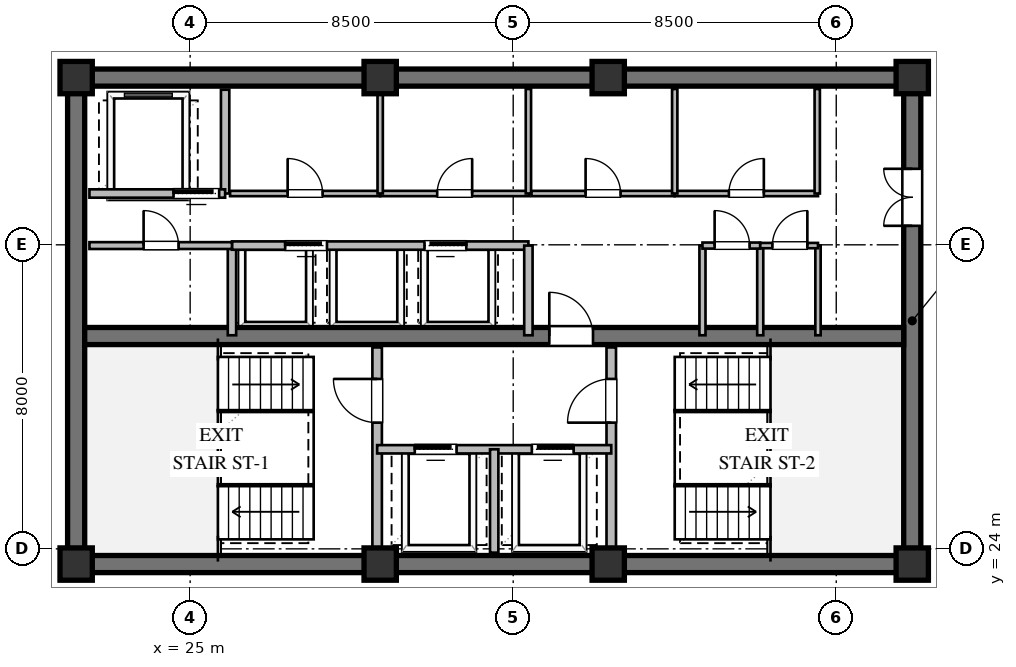
"""IFC4 building model, lengths in metres.
Left out: names, types, materials, properties, quantities, classifications, styles, units other than length and angle.
Written with IfcOpenShell. Run it as: python <this file> out.ifc"""

import sys

from ifc_helpers import new_model, si_unit, direction, frame, frame_2d, origin, origin_2d, place, context, subcontext, project, spatial, rectangle, extrude, element, fill, save


model = new_model("IFC4")
c1 = context("Model", 3, precision=1e-05, world=origin(), true_north=direction((0.0, 1.0)))
c2 = subcontext(c1, "Body", "Model", "MODEL_VIEW")
j1 = project(units=[si_unit("LENGTHUNIT", "METRE"), si_unit("PLANEANGLEUNIT", "RADIAN")], contexts=[c1])
p1 = place(None, origin())
s1 = spatial("IfcSite", under=j1, at=p1, CompositionType="ELEMENT")
p2 = place(p1, origin())
s2 = spatial("IfcBuilding", under=s1, at=p2, CompositionType="ELEMENT")
p3 = place(p2, frame((0.0, 0.0, 231.6)))
s3 = spatial("IfcBuildingStorey", under=s2, at=p3, CompositionType="ELEMENT", Elevation=231.6)
for number, where, z_axis, x_axis in (
    (1, (21.775, 23.6, 0.0), (0.0, 0.0, 1.0), (1.0, 0.0, 0.0)),
    (2, (21.775, 36.4, 0.0), (0.0, 0.0, 1.0), (1.0, 0.0, 0.0)),
):
    element("IfcWall", number, at=place(p3, frame(where, z_axis=z_axis, x_axis=x_axis)), inside=s3, PredefinedType="SHEAR", context=c2, shape_type="SweptSolid", body=[
        extrude(rectangle(XDim=22.45, YDim=0.45, at=frame_2d((11.225, 0.0))), origin(), (0.0, 0.0, 1.0), 3.36),
    ])
p4 = place(p3, frame((22.0, 23.825, 0.0), z_axis=(0.0, 0.0, 1.0), x_axis=(0.0, 1.0, 0.0)))
e3 = element("IfcWall", 3, at=p4, inside=s3, PredefinedType="SHEAR", context=c2, shape_type="SweptSolid", body=[
    extrude(rectangle(XDim=12.35, YDim=0.45, at=frame_2d((6.175, 0.0))), origin(), (0.0, 0.0, 1.0), 3.36),
])
p5 = place(p3, frame((44.0, 23.825, 0.0), z_axis=(0.0, 0.0, 1.0), x_axis=(0.0, 1.0, 0.0)))
e4 = element("IfcWall", 4, at=p5, inside=s3, PredefinedType="SHEAR", context=c2, shape_type="SweptSolid", body=[
    extrude(rectangle(XDim=12.35, YDim=0.45, at=frame_2d((6.175, 0.0))), origin(), (0.0, 0.0, 1.0), 3.36),
])
p6 = place(p5, frame((8.675, 0.0, 0.0)))
e5 = element("IfcOpeningElement", 5, at=p6, cuts=e4, PredefinedType="OPENING", context=c2, shape_type="SweptSolid", body=[
    extrude(rectangle(XDim=1.5, YDim=2.15, at=frame_2d((0.75, 1.075))), frame((0.0, 0.235, 0.0), z_axis=(0.0, -1.0, 0.0), x_axis=(1.0, 0.0, 0.0)), (0.0, 0.0, 1.0), 0.47),
])
p7 = place(p3, frame((22.225, 29.6, 0.0), z_axis=(0.0, 0.0, 1.0), x_axis=(1.0, 0.0, 0.0)))
e6 = element("IfcWall", 6, at=p7, inside=s3, PredefinedType="SHEAR", context=c2, shape_type="SweptSolid", body=[
    extrude(rectangle(XDim=21.55, YDim=0.45, at=frame_2d((10.775, 0.0))), origin(), (0.0, 0.0, 1.0), 3.36),
])
p8 = place(p7, frame((12.225, 0.0, 0.0)))
e7 = element("IfcOpeningElement", 7, at=p8, cuts=e6, PredefinedType="OPENING", context=c2, shape_type="SweptSolid", body=[
    extrude(rectangle(XDim=1.15, YDim=2.1, at=frame_2d((0.575, 1.05))), frame((0.0, 0.235, 0.0), z_axis=(0.0, -1.0, 0.0), x_axis=(1.0, 0.0, 0.0)), (0.0, 0.0, 1.0), 0.47),
])
for number, where, z_axis, x_axis in (
    (8, (22.0, 23.6, 0.0), (0.0, 0.0, 1.0), (1.0, 0.0, 0.0)),
    (9, (30.0, 23.6, 0.0), (0.0, 0.0, 1.0), (1.0, 0.0, 0.0)),
    (10, (36.0, 23.6, 0.0), (0.0, 0.0, 1.0), (1.0, 0.0, 0.0)),
    (11, (44.0, 23.6, 0.0), (0.0, 0.0, 1.0), (1.0, 0.0, 0.0)),
    (12, (44.0, 36.4, 0.0), (0.0, 0.0, 1.0), (1.0, 0.0, 0.0)),
    (13, (36.0, 36.4, 0.0), (0.0, 0.0, 1.0), (1.0, 0.0, 0.0)),
    (14, (30.0, 36.4, 0.0), (0.0, 0.0, 1.0), (1.0, 0.0, 0.0)),
    (15, (22.0, 36.4, 0.0), (0.0, 0.0, 1.0), (1.0, 0.0, 0.0)),
):
    element("IfcColumn", number, at=place(p3, frame(where, z_axis=z_axis, x_axis=x_axis)), inside=s3, PredefinedType="COLUMN", context=c2, shape_type="SweptSolid", body=[
        extrude(rectangle(XDim=0.85, YDim=0.85, at=origin_2d()), origin(), (0.0, 0.0, 1.0), 3.6),
    ])
p9 = place(p3, frame((29.92, 23.9, 0.0), z_axis=(0.0, 0.0, 1.0), x_axis=(0.0, 1.0, 0.0)))
e16 = element("IfcWall", 16, at=p9, inside=s3, PredefinedType="SOLIDWALL", context=c2, shape_type="SweptSolid", body=[
    extrude(rectangle(XDim=5.4, YDim=0.25, at=frame_2d((2.7, 0.0))), origin(), (0.0, 0.0, 1.0), 3.36),
])
p10 = place(p9, frame((3.421, 0.0, 0.0)))
e17 = element("IfcOpeningElement", 17, at=p10, cuts=e16, PredefinedType="OPENING", context=c2, shape_type="SweptSolid", body=[
    extrude(rectangle(XDim=1.15, YDim=2.1, at=frame_2d((0.575, 1.05))), frame((0.0, 0.135, 0.0), z_axis=(0.0, -1.0, 0.0), x_axis=(1.0, 0.0, 0.0)), (0.0, 0.0, 1.0), 0.27),
])
p11 = place(p3, frame((36.08, 23.9, 0.0), z_axis=(0.0, 0.0, 1.0), x_axis=(0.0, 1.0, 0.0)))
e18 = element("IfcWall", 18, at=p11, inside=s3, PredefinedType="SOLIDWALL", context=c2, shape_type="SweptSolid", body=[
    extrude(rectangle(XDim=5.4, YDim=0.25, at=frame_2d((2.7, 0.0))), origin(), (0.0, 0.0, 1.0), 3.36),
])
p12 = place(p11, frame((3.421, 0.0, 0.0)))
e19 = element("IfcOpeningElement", 19, at=p12, cuts=e18, PredefinedType="OPENING", context=c2, shape_type="SweptSolid", body=[
    extrude(rectangle(XDim=1.15, YDim=2.1, at=frame_2d((0.575, 1.05))), frame((0.0, 0.135, 0.0), z_axis=(0.0, -1.0, 0.0), x_axis=(1.0, 0.0, 0.0)), (0.0, 0.0, 1.0), 0.27),
])
p13 = place(p3, frame((29.92, 26.62, 0.0), z_axis=(0.0, 0.0, 1.0), x_axis=(1.0, 0.0, 0.0)))
e20 = element("IfcWall", 20, at=p13, inside=s3, PredefinedType="SOLIDWALL", context=c2, shape_type="SweptSolid", body=[
    extrude(rectangle(XDim=6.16, YDim=0.22, at=frame_2d((3.08, 0.0))), origin(), (0.0, 0.0, 1.0), 3.36),
])
p14 = place(p13, frame((0.99, 0.0, 0.0)))
e21 = element("IfcOpeningElement", 21, at=p14, cuts=e20, PredefinedType="OPENING", context=c2, shape_type="SweptSolid", body=[
    extrude(rectangle(XDim=1.1, YDim=2.1, at=frame_2d((0.55, 1.05))), frame((0.0, 0.12, 0.0), z_axis=(0.0, -1.0, 0.0), x_axis=(1.0, 0.0, 0.0)), (0.0, 0.0, 1.0), 0.24),
])
p15 = place(p13, frame((4.07, 0.0, 0.0)))
e22 = element("IfcOpeningElement", 22, at=p15, cuts=e20, PredefinedType="OPENING", context=c2, shape_type="SweptSolid", body=[
    extrude(rectangle(XDim=1.1, YDim=2.1, at=frame_2d((0.55, 1.05))), frame((0.0, 0.12, 0.0), z_axis=(0.0, -1.0, 0.0), x_axis=(1.0, 0.0, 0.0)), (0.0, 0.0, 1.0), 0.24),
])
p16 = place(p3, frame((33.0, 23.9, 0.0), z_axis=(0.0, 0.0, 1.0), x_axis=(0.0, 1.0, 0.0)))
e23 = element("IfcWall", 23, at=p16, inside=s3, PredefinedType="SOLIDWALL", context=c2, shape_type="SweptSolid", body=[
    extrude(rectangle(XDim=2.72, YDim=0.22, at=frame_2d((1.36, 0.0))), origin(), (0.0, 0.0, 1.0), 3.36),
])
p17 = place(p3, frame((25.92, 33.35, 0.0), z_axis=(0.0, 0.0, 1.0), x_axis=(0.0, 1.0, 0.0)))
e24 = element("IfcWall", 24, at=p17, inside=s3, PredefinedType="SOLIDWALL", context=c2, shape_type="SweptSolid", body=[
    extrude(rectangle(XDim=2.73, YDim=0.22, at=frame_2d((1.365, 0.0))), origin(), (0.0, 0.0, 1.0), 3.36),
])
p18 = place(p3, frame((22.35, 33.35, 0.0), z_axis=(0.0, 0.0, 1.0), x_axis=(1.0, 0.0, 0.0)))
e25 = element("IfcWall", 25, at=p18, inside=s3, PredefinedType="SOLIDWALL", context=c2, shape_type="SweptSolid", body=[
    extrude(rectangle(XDim=3.57, YDim=0.22, at=frame_2d((1.785, 0.0))), origin(), (0.0, 0.0, 1.0), 3.36),
])
p19 = place(p18, frame((2.213, 0.0, 0.0)))
e26 = element("IfcOpeningElement", 26, at=p19, cuts=e25, PredefinedType="OPENING", context=c2, shape_type="SweptSolid", body=[
    extrude(rectangle(XDim=1.2, YDim=2.1, at=frame_2d((0.6, 1.05))), frame((0.0, 0.12, 0.0), z_axis=(0.0, -1.0, 0.0), x_axis=(1.0, 0.0, 0.0)), (0.0, 0.0, 1.0), 0.24),
])
p20 = place(p3, frame((26.1, 29.62, 0.0), z_axis=(0.0, 0.0, 1.0), x_axis=(0.0, 1.0, 0.0)))
e27 = element("IfcWall", 27, at=p20, inside=s3, PredefinedType="SOLIDWALL", context=c2, shape_type="SweptSolid", body=[
    extrude(rectangle(XDim=2.36, YDim=0.22, at=frame_2d((1.18, 0.0))), origin(), (0.0, 0.0, 1.0), 3.36),
])
p21 = place(p3, frame((26.1, 31.98, 0.0), z_axis=(0.0, 0.0, 1.0), x_axis=(1.0, 0.0, 0.0)))
e28 = element("IfcWall", 28, at=p21, inside=s3, PredefinedType="SOLIDWALL", context=c2, shape_type="SweptSolid", body=[
    extrude(rectangle(XDim=7.8, YDim=0.22, at=frame_2d((3.9, 0.0))), origin(), (0.0, 0.0, 1.0), 3.36),
])
p22 = place(p21, frame((1.4, 0.0, 0.0)))
e29 = element("IfcOpeningElement", 29, at=p22, cuts=e28, PredefinedType="OPENING", context=c2, shape_type="SweptSolid", body=[
    extrude(rectangle(XDim=1.1, YDim=2.1, at=frame_2d((0.55, 1.05))), frame((0.0, 0.12, 0.0), z_axis=(0.0, -1.0, 0.0), x_axis=(1.0, 0.0, 0.0)), (0.0, 0.0, 1.0), 0.24),
])
p23 = place(p21, frame((5.066, 0.0, 0.0)))
e30 = element("IfcOpeningElement", 30, at=p23, cuts=e28, PredefinedType="OPENING", context=c2, shape_type="SweptSolid", body=[
    extrude(rectangle(XDim=1.1, YDim=2.1, at=frame_2d((0.55, 1.05))), frame((0.0, 0.12, 0.0), z_axis=(0.0, -1.0, 0.0), x_axis=(1.0, 0.0, 0.0)), (0.0, 0.0, 1.0), 0.24),
])
p24 = place(p3, frame((33.9, 29.62, 0.0), z_axis=(0.0, 0.0, 1.0), x_axis=(0.0, 1.0, 0.0)))
e31 = element("IfcWall", 31, at=p24, inside=s3, PredefinedType="SOLIDWALL", context=c2, shape_type="SweptSolid", body=[
    extrude(rectangle(XDim=2.36, YDim=0.22, at=frame_2d((1.18, 0.0))), origin(), (0.0, 0.0, 1.0), 3.36),
])
p25 = place(p3, frame((26.05, 33.35, 0.0), z_axis=(0.0, 0.0, 1.0), x_axis=(1.0, 0.0, 0.0)))
e32 = element("IfcWall", 32, at=p25, inside=s3, PredefinedType="PARTITIONING", context=c2, shape_type="SweptSolid", body=[
    extrude(rectangle(XDim=3.95, YDim=0.14, at=frame_2d((1.975, 0.0))), origin(), (0.0, 0.0, 1.0), 3.36),
])
p26 = place(p25, frame((1.515, 0.0, 0.0)))
e33 = element("IfcOpeningElement", 33, at=p26, cuts=e32, PredefinedType="OPENING", context=c2, shape_type="SweptSolid", body=[
    extrude(rectangle(XDim=0.92, YDim=2.1, at=frame_2d((0.46, 1.05))), frame((0.0, 0.08, 0.0), z_axis=(0.0, -1.0, 0.0), x_axis=(1.0, 0.0, 0.0)), (0.0, 0.0, 1.0), 0.16),
])
p27 = place(p3, frame((30.0, 33.35, 0.0), z_axis=(0.0, 0.0, 1.0), x_axis=(1.0, 0.0, 0.0)))
e34 = element("IfcWall", 34, at=p27, inside=s3, PredefinedType="PARTITIONING", context=c2, shape_type="SweptSolid", body=[
    extrude(rectangle(XDim=3.92, YDim=0.14, at=frame_2d((1.96, 0.0))), origin(), (0.0, 0.0, 1.0), 3.36),
])
p28 = place(p27, frame((1.5, 0.0, 0.0)))
e35 = element("IfcOpeningElement", 35, at=p28, cuts=e34, PredefinedType="OPENING", context=c2, shape_type="SweptSolid", body=[
    extrude(rectangle(XDim=0.92, YDim=2.1, at=frame_2d((0.46, 1.05))), frame((0.0, 0.08, 0.0), z_axis=(0.0, -1.0, 0.0), x_axis=(1.0, 0.0, 0.0)), (0.0, 0.0, 1.0), 0.16),
])
for number, where, z_axis, x_axis in (
    (36, (30.0, 33.35, 0.0), (0.0, 0.0, 1.0), (0.0, 1.0, 0.0)),
    (37, (33.9, 33.35, 0.0), (0.0, 0.0, 1.0), (0.0, 1.0, 0.0)),
):
    element("IfcWall", number, at=place(p3, frame(where, z_axis=z_axis, x_axis=x_axis)), inside=s3, PredefinedType="PARTITIONING", context=c2, shape_type="SweptSolid", body=[
        extrude(rectangle(XDim=2.75, YDim=0.14, at=frame_2d((1.375, 0.0))), origin(), (0.0, 0.0, 1.0), 3.36),
    ])
p29 = place(p3, frame((33.98, 33.35, 0.0), z_axis=(0.0, 0.0, 1.0), x_axis=(1.0, 0.0, 0.0)))
e38 = element("IfcWall", 38, at=p29, inside=s3, PredefinedType="PARTITIONING", context=c2, shape_type="SweptSolid", body=[
    extrude(rectangle(XDim=3.77, YDim=0.14, at=frame_2d((1.885, 0.0))), origin(), (0.0, 0.0, 1.0), 3.36),
])
p30 = place(p29, frame((1.425, 0.0, 0.0)))
e39 = element("IfcOpeningElement", 39, at=p30, cuts=e38, PredefinedType="OPENING", context=c2, shape_type="SweptSolid", body=[
    extrude(rectangle(XDim=0.92, YDim=2.1, at=frame_2d((0.46, 1.05))), frame((0.0, 0.08, 0.0), z_axis=(0.0, -1.0, 0.0), x_axis=(1.0, 0.0, 0.0)), (0.0, 0.0, 1.0), 0.16),
])
p31 = place(p3, frame((37.75, 33.35, 0.0), z_axis=(0.0, 0.0, 1.0), x_axis=(1.0, 0.0, 0.0)))
e40 = element("IfcWall", 40, at=p31, inside=s3, PredefinedType="PARTITIONING", context=c2, shape_type="SweptSolid", body=[
    extrude(rectangle(XDim=3.77, YDim=0.14, at=frame_2d((1.885, 0.0))), origin(), (0.0, 0.0, 1.0), 3.36),
])
p32 = place(p31, frame((1.425, 0.0, 0.0)))
e41 = element("IfcOpeningElement", 41, at=p32, cuts=e40, PredefinedType="OPENING", context=c2, shape_type="SweptSolid", body=[
    extrude(rectangle(XDim=0.92, YDim=2.1, at=frame_2d((0.46, 1.05))), frame((0.0, 0.08, 0.0), z_axis=(0.0, -1.0, 0.0), x_axis=(1.0, 0.0, 0.0)), (0.0, 0.0, 1.0), 0.16),
])
for number, where, z_axis, x_axis in (
    (42, (37.75, 33.35, 0.0), (0.0, 0.0, 1.0), (0.0, 1.0, 0.0)),
    (43, (41.5, 33.35, 0.0), (0.0, 0.0, 1.0), (0.0, 1.0, 0.0)),
):
    element("IfcWall", number, at=place(p3, frame(where, z_axis=z_axis, x_axis=x_axis)), inside=s3, PredefinedType="PARTITIONING", context=c2, shape_type="SweptSolid", body=[
        extrude(rectangle(XDim=2.75, YDim=0.14, at=frame_2d((1.375, 0.0))), origin(), (0.0, 0.0, 1.0), 3.36),
    ])
p33 = place(p3, frame((22.35, 31.98, 0.0), z_axis=(0.0, 0.0, 1.0), x_axis=(1.0, 0.0, 0.0)))
e44 = element("IfcWall", 44, at=p33, inside=s3, PredefinedType="PARTITIONING", context=c2, shape_type="SweptSolid", body=[
    extrude(rectangle(XDim=3.75, YDim=0.18, at=frame_2d((1.875, 0.0))), origin(), (0.0, 0.0, 1.0), 3.36),
])
p34 = place(p33, frame((1.425, 0.0, 0.0)))
e45 = element("IfcOpeningElement", 45, at=p34, cuts=e44, PredefinedType="OPENING", context=c2, shape_type="SweptSolid", body=[
    extrude(rectangle(XDim=0.92, YDim=2.1, at=frame_2d((0.46, 1.05))), frame((0.0, 0.1, 0.0), z_axis=(0.0, -1.0, 0.0), x_axis=(1.0, 0.0, 0.0)), (0.0, 0.0, 1.0), 0.2),
])
for number, where, z_axis, x_axis in (
    (46, (38.48, 29.62, 0.0), (0.0, 0.0, 1.0), (0.0, 1.0, 0.0)),
    (47, (40.0, 29.62, 0.0), (0.0, 0.0, 1.0), (0.0, 1.0, 0.0)),
):
    element("IfcWall", number, at=place(p3, frame(where, z_axis=z_axis, x_axis=x_axis)), inside=s3, PredefinedType="PLUMBINGWALL", context=c2, shape_type="SweptSolid", body=[
        extrude(rectangle(XDim=2.36, YDim=0.16, at=frame_2d((1.18, 0.0))), origin(), (0.0, 0.0, 1.0), 3.36),
    ])
p35 = place(p3, frame((41.52, 29.62, 0.0), z_axis=(0.0, 0.0, 1.0), x_axis=(0.0, 1.0, 0.0)))
e48 = element("IfcWall", 48, at=p35, inside=s3, PredefinedType="PARTITIONING", context=c2, shape_type="SweptSolid", body=[
    extrude(rectangle(XDim=2.36, YDim=0.14, at=frame_2d((1.18, 0.0))), origin(), (0.0, 0.0, 1.0), 3.36),
])
p36 = place(p3, frame((38.48, 31.98, 0.0), z_axis=(0.0, 0.0, 1.0), x_axis=(1.0, 0.0, 0.0)))
e49 = element("IfcWall", 49, at=p36, inside=s3, PredefinedType="PLUMBINGWALL", context=c2, shape_type="SweptSolid", body=[
    extrude(rectangle(XDim=1.52, YDim=0.16, at=frame_2d((0.76, 0.0))), origin(), (0.0, 0.0, 1.0), 3.36),
])
p37 = place(p36, frame((0.32, 0.0, 0.0)))
e50 = element("IfcOpeningElement", 50, at=p37, cuts=e49, PredefinedType="OPENING", context=c2, shape_type="SweptSolid", body=[
    extrude(rectangle(XDim=0.92, YDim=2.1, at=frame_2d((0.46, 1.05))), frame((0.0, 0.09, 0.0), z_axis=(0.0, -1.0, 0.0), x_axis=(1.0, 0.0, 0.0)), (0.0, 0.0, 1.0), 0.18),
])
p38 = place(p3, frame((40.0, 31.98, 0.0), z_axis=(0.0, 0.0, 1.0), x_axis=(1.0, 0.0, 0.0)))
e51 = element("IfcWall", 51, at=p38, inside=s3, PredefinedType="PARTITIONING", context=c2, shape_type="SweptSolid", body=[
    extrude(rectangle(XDim=1.52, YDim=0.14, at=frame_2d((0.76, 0.0))), origin(), (0.0, 0.0, 1.0), 3.36),
])
p39 = place(p38, frame((0.32, 0.0, 0.0)))
e52 = element("IfcOpeningElement", 52, at=p39, cuts=e51, PredefinedType="OPENING", context=c2, shape_type="SweptSolid", body=[
    extrude(rectangle(XDim=0.92, YDim=2.1, at=frame_2d((0.46, 1.05))), frame((0.0, 0.08, 0.0), z_axis=(0.0, -1.0, 0.0), x_axis=(1.0, 0.0, 0.0)), (0.0, 0.0, 1.0), 0.16),
])
p40 = place(p10, origin())
e53 = element("IfcDoor", 53, at=p40, inside=s3, OperationType="SINGLE_SWING_RIGHT", PredefinedType="DOOR", context=c2, shape_type="SweptSolid", body=[
    extrude(rectangle(XDim=1.15, YDim=2.1, at=frame_2d((0.575, 1.05))), frame((0.0, 0.025, 0.0), z_axis=(0.0, -1.0, 0.0), x_axis=(1.0, 0.0, 0.0)), (0.0, 0.0, 1.0), 0.05),
])
fill(e17, e53)
p41 = place(p12, origin())
e54 = element("IfcDoor", 54, at=p41, inside=s3, OperationType="SINGLE_SWING_LEFT", PredefinedType="DOOR", context=c2, shape_type="SweptSolid", body=[
    extrude(rectangle(XDim=1.15, YDim=2.1, at=frame_2d((0.575, 1.05))), frame((0.0, 0.025, 0.0), z_axis=(0.0, -1.0, 0.0), x_axis=(1.0, 0.0, 0.0)), (0.0, 0.0, 1.0), 0.05),
])
fill(e19, e54)
p42 = place(p14, origin())
e55 = element("IfcDoor", 55, at=p42, inside=s3, OperationType="SLIDING_TO_LEFT", PredefinedType="DOOR", context=c2, shape_type="SweptSolid", body=[
    extrude(rectangle(XDim=1.1, YDim=2.1, at=frame_2d((0.55, 1.05))), frame((0.0, 0.025, 0.0), z_axis=(0.0, -1.0, 0.0), x_axis=(1.0, 0.0, 0.0)), (0.0, 0.0, 1.0), 0.05),
])
fill(e21, e55)
p43 = place(p15, origin())
e56 = element("IfcDoor", 56, at=p43, inside=s3, OperationType="SLIDING_TO_RIGHT", PredefinedType="DOOR", context=c2, shape_type="SweptSolid", body=[
    extrude(rectangle(XDim=1.1, YDim=2.1, at=frame_2d((0.55, 1.05))), frame((0.0, 0.025, 0.0), z_axis=(0.0, -1.0, 0.0), x_axis=(1.0, 0.0, 0.0)), (0.0, 0.0, 1.0), 0.05),
])
fill(e22, e56)
p44 = place(p8, origin())
e57 = element("IfcDoor", 57, at=p44, inside=s3, OperationType="SINGLE_SWING_LEFT", PredefinedType="DOOR", context=c2, shape_type="SweptSolid", body=[
    extrude(rectangle(XDim=1.15, YDim=2.1, at=frame_2d((0.575, 1.05))), frame((0.0, 0.025, 0.0), z_axis=(0.0, -1.0, 0.0), x_axis=(1.0, 0.0, 0.0)), (0.0, 0.0, 1.0), 0.05),
])
fill(e7, e57)
p45 = place(p6, origin())
e58 = element("IfcDoor", 58, at=p45, inside=s3, OperationType="DOUBLE_DOOR_SINGLE_SWING", PredefinedType="DOOR", context=c2, shape_type="SweptSolid", body=[
    extrude(rectangle(XDim=1.5, YDim=2.15, at=frame_2d((0.75, 1.075))), frame((0.0, 0.025, 0.0), z_axis=(0.0, -1.0, 0.0), x_axis=(1.0, 0.0, 0.0)), (0.0, 0.0, 1.0), 0.05),
])
fill(e5, e58)
p46 = place(p19, origin())
e59 = element("IfcDoor", 59, at=p46, inside=s3, OperationType="SLIDING_TO_LEFT", PredefinedType="DOOR", context=c2, shape_type="SweptSolid", body=[
    extrude(rectangle(XDim=1.2, YDim=2.1, at=frame_2d((0.6, 1.05))), frame((0.0, 0.025, 0.0), z_axis=(0.0, -1.0, 0.0), x_axis=(1.0, 0.0, 0.0)), (0.0, 0.0, 1.0), 0.05),
])
fill(e26, e59)
p47 = place(p22, origin())
e60 = element("IfcDoor", 60, at=p47, inside=s3, OperationType="SLIDING_TO_LEFT", PredefinedType="DOOR", context=c2, shape_type="SweptSolid", body=[
    extrude(rectangle(XDim=1.1, YDim=2.1, at=frame_2d((0.55, 1.05))), frame((0.0, 0.025, 0.0), z_axis=(0.0, -1.0, 0.0), x_axis=(1.0, 0.0, 0.0)), (0.0, 0.0, 1.0), 0.05),
])
fill(e29, e60)
p48 = place(p23, origin())
e61 = element("IfcDoor", 61, at=p48, inside=s3, OperationType="SLIDING_TO_RIGHT", PredefinedType="DOOR", context=c2, shape_type="SweptSolid", body=[
    extrude(rectangle(XDim=1.1, YDim=2.1, at=frame_2d((0.55, 1.05))), frame((0.0, 0.025, 0.0), z_axis=(0.0, -1.0, 0.0), x_axis=(1.0, 0.0, 0.0)), (0.0, 0.0, 1.0), 0.05),
])
fill(e30, e61)
p49 = place(p26, origin())
e62 = element("IfcDoor", 62, at=p49, inside=s3, OperationType="SINGLE_SWING_LEFT", PredefinedType="DOOR", context=c2, shape_type="SweptSolid", body=[
    extrude(rectangle(XDim=0.92, YDim=2.1, at=frame_2d((0.46, 1.05))), frame((0.0, 0.025, 0.0), z_axis=(0.0, -1.0, 0.0), x_axis=(1.0, 0.0, 0.0)), (0.0, 0.0, 1.0), 0.05),
])
fill(e33, e62)
p50 = place(p28, origin())
e63 = element("IfcDoor", 63, at=p50, inside=s3, OperationType="SINGLE_SWING_RIGHT", PredefinedType="DOOR", context=c2, shape_type="SweptSolid", body=[
    extrude(rectangle(XDim=0.92, YDim=2.1, at=frame_2d((0.46, 1.05))), frame((0.0, 0.025, 0.0), z_axis=(0.0, -1.0, 0.0), x_axis=(1.0, 0.0, 0.0)), (0.0, 0.0, 1.0), 0.05),
])
fill(e35, e63)
p51 = place(p30, origin())
e64 = element("IfcDoor", 64, at=p51, inside=s3, OperationType="SINGLE_SWING_LEFT", PredefinedType="DOOR", context=c2, shape_type="SweptSolid", body=[
    extrude(rectangle(XDim=0.92, YDim=2.1, at=frame_2d((0.46, 1.05))), frame((0.0, 0.025, 0.0), z_axis=(0.0, -1.0, 0.0), x_axis=(1.0, 0.0, 0.0)), (0.0, 0.0, 1.0), 0.05),
])
fill(e39, e64)
p52 = place(p32, origin())
e65 = element("IfcDoor", 65, at=p52, inside=s3, OperationType="SINGLE_SWING_RIGHT", PredefinedType="DOOR", context=c2, shape_type="SweptSolid", body=[
    extrude(rectangle(XDim=0.92, YDim=2.1, at=frame_2d((0.46, 1.05))), frame((0.0, 0.025, 0.0), z_axis=(0.0, -1.0, 0.0), x_axis=(1.0, 0.0, 0.0)), (0.0, 0.0, 1.0), 0.05),
])
fill(e41, e65)
p53 = place(p34, origin())
e66 = element("IfcDoor", 66, at=p53, inside=s3, OperationType="SINGLE_SWING_LEFT", PredefinedType="DOOR", context=c2, shape_type="SweptSolid", body=[
    extrude(rectangle(XDim=0.92, YDim=2.1, at=frame_2d((0.46, 1.05))), frame((0.0, 0.025, 0.0), z_axis=(0.0, -1.0, 0.0), x_axis=(1.0, 0.0, 0.0)), (0.0, 0.0, 1.0), 0.05),
])
fill(e45, e66)
p54 = place(p37, origin())
e67 = element("IfcDoor", 67, at=p54, inside=s3, OperationType="SINGLE_SWING_LEFT", PredefinedType="DOOR", context=c2, shape_type="SweptSolid", body=[
    extrude(rectangle(XDim=0.92, YDim=2.1, at=frame_2d((0.46, 1.05))), frame((0.0, 0.025, 0.0), z_axis=(0.0, -1.0, 0.0), x_axis=(1.0, 0.0, 0.0)), (0.0, 0.0, 1.0), 0.05),
])
fill(e50, e67)
p55 = place(p39, origin())
e68 = element("IfcDoor", 68, at=p55, inside=s3, OperationType="SINGLE_SWING_RIGHT", PredefinedType="DOOR", context=c2, shape_type="SweptSolid", body=[
    extrude(rectangle(XDim=0.92, YDim=2.1, at=frame_2d((0.46, 1.05))), frame((0.0, 0.025, 0.0), z_axis=(0.0, -1.0, 0.0), x_axis=(1.0, 0.0, 0.0)), (0.0, 0.0, 1.0), 0.05),
])
fill(e52, e68)
save(model, sys.argv[1])
